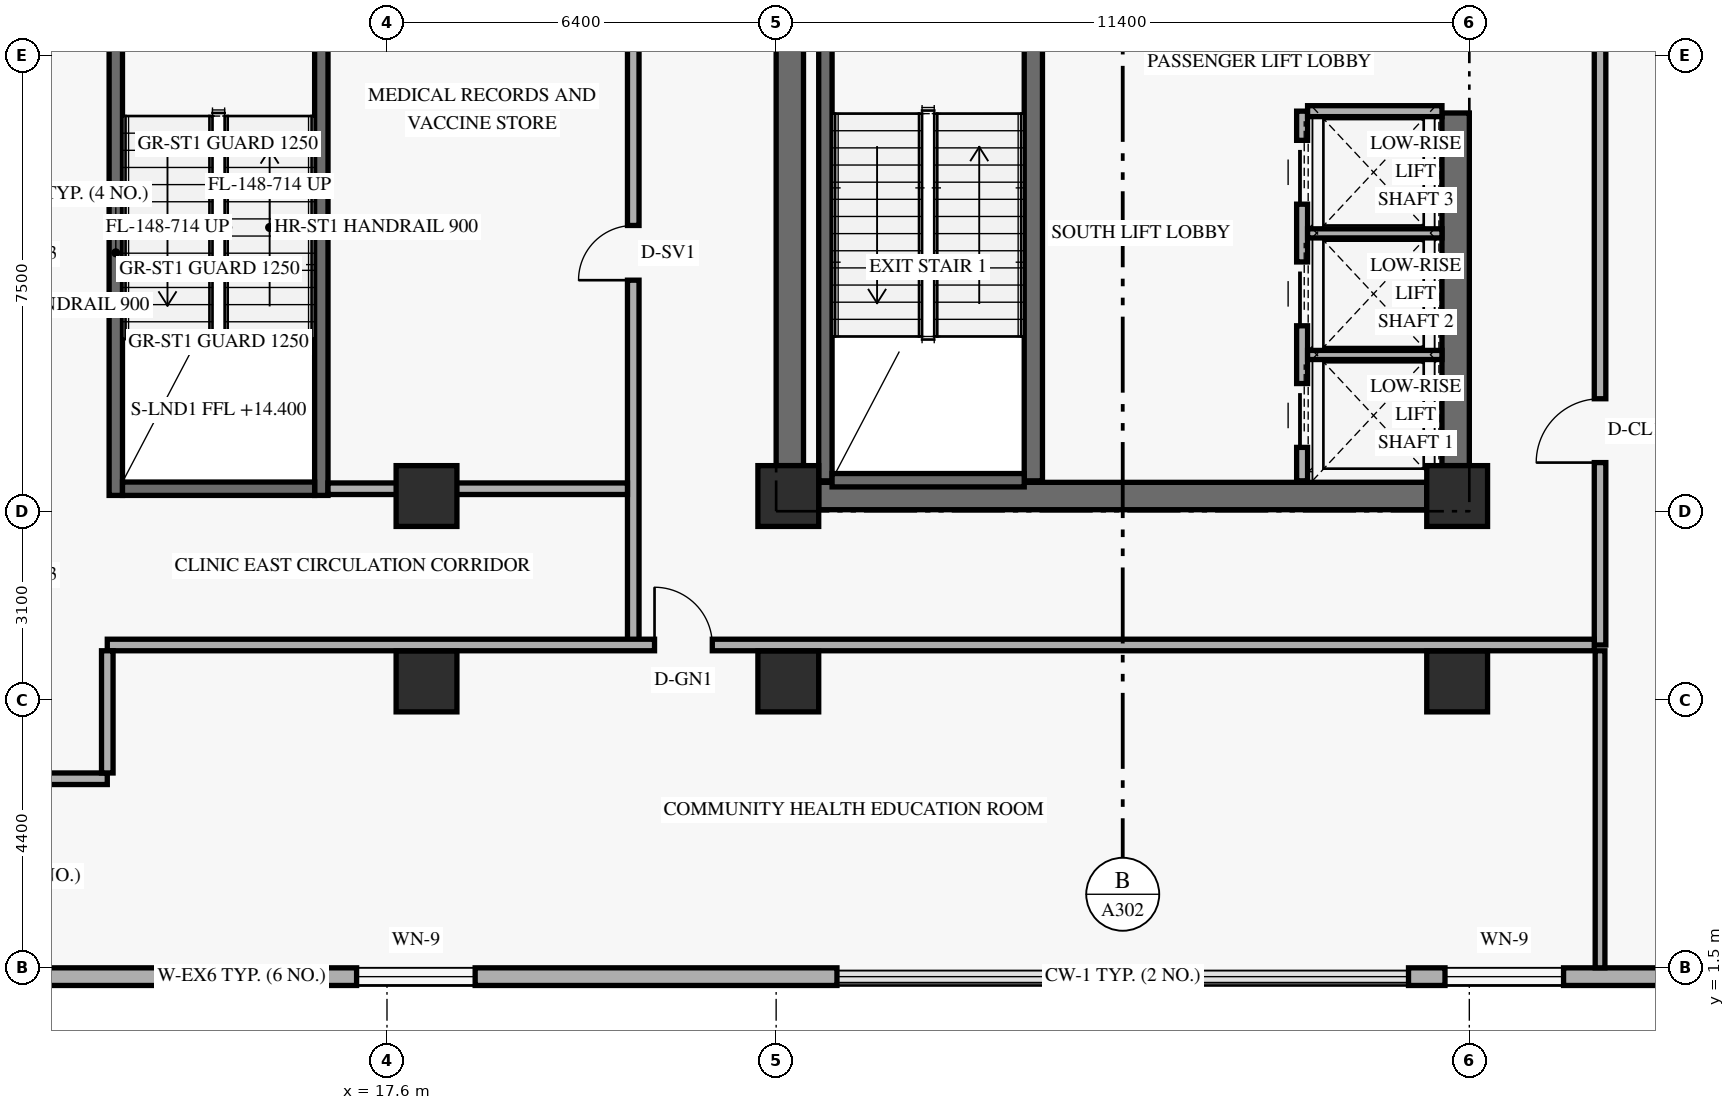
"""IFC4 building model, lengths in metres.
Left out: names, types, materials, properties, quantities, classifications, styles, units other than length and angle.
Written with IfcOpenShell. Run it as: python <this file> out.ifc"""

import sys

from ifc_helpers import new_model, si_unit, direction, frame, frame_2d, origin, origin_2d, place, context, subcontext, project, spatial, rectangle, extrude, element, fill, save


model = new_model("IFC4")
c1 = context("Model", 3, precision=1e-05, world=origin(), true_north=direction((0.0, 1.0)))
c2 = subcontext(c1, "Body", "Model", "MODEL_VIEW")
j1 = project(units=[si_unit("LENGTHUNIT", "METRE"), si_unit("PLANEANGLEUNIT", "RADIAN")], contexts=[c1])
p1 = place(None, origin())
s1 = spatial("IfcSite", under=j1, at=p1, CompositionType="ELEMENT")
p2 = place(p1, origin())
s2 = spatial("IfcBuilding", under=s1, at=p2, CompositionType="ELEMENT")
p3 = place(p2, frame((0.0, 0.0, 14.4)))
s3 = spatial("IfcBuildingStorey", under=s2, at=p3, CompositionType="ELEMENT", Elevation=14.4)
p4 = place(p3, frame((24.225, 9.75, 0.0), z_axis=(0.0, 0.0, 1.0), x_axis=(0.0, 1.0, 0.0)))
e1 = element("IfcWall", 1, at=p4, inside=s3, PredefinedType="SHEAR", context=c2, shape_type="SweptSolid", body=[
    extrude(rectangle(XDim=7.3, YDim=0.45, at=frame_2d((3.65, 0.0))), origin(), (0.0, 0.0, 1.0), 3.62),
])
p5 = place(p3, frame((35.175, 9.75, 0.0), z_axis=(0.0, 0.0, 1.0), x_axis=(0.0, 1.0, 0.0)))
e2 = element("IfcWall", 2, at=p5, inside=s3, PredefinedType="SHEAR", context=c2, shape_type="SweptSolid", body=[
    extrude(rectangle(XDim=5.8, YDim=0.45, at=frame_2d((2.9, 0.0))), origin(), (0.0, 0.0, 1.0), 3.62),
])
p6 = place(p3, frame((24.7, 9.25, 0.0), z_axis=(0.0, 0.0, 1.0), x_axis=(1.0, 0.0, 0.0)))
e3 = element("IfcWall", 3, at=p6, inside=s3, PredefinedType="SHEAR", context=c2, shape_type="SweptSolid", body=[
    extrude(rectangle(XDim=10.0, YDim=0.45, at=frame_2d((5.0, 0.0))), origin(), (0.0, 0.0, 1.0), 4.39),
])
p7 = place(p3, frame((24.81, 9.5, 0.0), z_axis=(0.0, 0.0, 1.0), x_axis=(0.0, 1.0, 0.0)))
e4 = element("IfcWall", 4, at=p7, inside=s3, PredefinedType="SHEAR", context=c2, shape_type="SweptSolid", body=[
    extrude(rectangle(XDim=7.76, YDim=0.22, at=frame_2d((3.88, 0.0))), origin(), (0.0, 0.0, 1.0), 4.39),
])
p8 = place(p3, frame((28.23, 9.5, 0.0), z_axis=(0.0, 0.0, 1.0), x_axis=(0.0, 1.0, 0.0)))
e5 = element("IfcWall", 5, at=p8, inside=s3, PredefinedType="SHEAR", context=c2, shape_type="SweptSolid", body=[
    extrude(rectangle(XDim=7.76, YDim=0.3, at=frame_2d((3.88, 0.0))), origin(), (0.0, 0.0, 1.0), 4.39),
])
p9 = place(p3, frame((24.92, 9.51, 0.0), z_axis=(0.0, 0.0, 1.0), x_axis=(1.0, 0.0, 0.0)))
e6 = element("IfcWall", 6, at=p9, inside=s3, PredefinedType="SHEAR", context=c2, shape_type="SweptSolid", body=[
    extrude(rectangle(XDim=3.16, YDim=0.22, at=frame_2d((1.58, 0.0))), origin(), (0.0, 0.0, 1.0), 4.39),
])
for number, where, z_axis, x_axis in (
    (7, (13.14, 9.26, 0.0), (0.0, 0.0, 1.0), (0.0, 1.0, 0.0)),
    (8, (16.52, 9.26, 0.0), (0.0, 0.0, 1.0), (0.0, 1.0, 0.0)),
):
    element("IfcWall", number, at=place(p3, frame(where, z_axis=z_axis, x_axis=x_axis)), inside=s3, PredefinedType="SHEAR", context=c2, shape_type="SweptSolid", body=[
        extrude(rectangle(XDim=7.98, YDim=0.22, at=frame_2d((3.99, 0.0))), origin(), (0.0, 0.0, 1.0), 4.39),
    ])
p10 = place(p3, frame((13.25, 9.37, 0.0), z_axis=(0.0, 0.0, 1.0), x_axis=(1.0, 0.0, 0.0)))
e9 = element("IfcWall", 9, at=p10, inside=s3, PredefinedType="SHEAR", context=c2, shape_type="SweptSolid", body=[
    extrude(rectangle(XDim=3.16, YDim=0.22, at=frame_2d((1.58, 0.0))), origin(), (0.0, 0.0, 1.0), 4.39),
])
for number, where, z_axis, x_axis in (
    (10, (18.25, 6.2, 0.0), (0.0, 0.0, 1.0), (1.0, 0.0, 0.0)),
    (11, (18.25, 9.25, 0.0), (0.0, 0.0, 1.0), (1.0, 0.0, 0.0)),
    (12, (24.2, 6.2, 0.0), (0.0, 0.0, 1.0), (1.0, 0.0, 0.0)),
    (13, (24.2, 9.25, 0.0), (0.0, 0.0, 1.0), (1.0, 0.0, 0.0)),
    (14, (35.2, 6.2, 0.0), (0.0, 0.0, 1.0), (1.0, 0.0, 0.0)),
    (15, (35.2, 9.25, 0.0), (0.0, 0.0, 1.0), (1.0, 0.0, 0.0)),
):
    element("IfcColumn", number, at=place(p3, frame(where, z_axis=z_axis, x_axis=x_axis)), inside=s3, PredefinedType="COLUMN", context=c2, shape_type="SweptSolid", body=[
        extrude(rectangle(XDim=1.0, YDim=1.0, at=origin_2d()), origin(), (0.0, 0.0, 1.0), 4.8),
    ])
p11 = place(p3, frame((5.42, 1.345, 0.0), z_axis=(0.0, 0.0, 1.0), x_axis=(1.0, 0.0, 0.0)))
e16 = element("IfcWall", 16, at=p11, inside=s3, PredefinedType="SOLIDWALL", context=c2, shape_type="SweptSolid", body=[
    extrude(rectangle(XDim=19.58, YDim=0.29, at=frame_2d((9.79, 0.0))), origin(), (0.0, 0.0, 1.0), 4.39),
])
p12 = place(p11, frame((1.89, 0.0, 0.85)))
e17 = element("IfcOpeningElement", 17, at=p12, cuts=e16, PredefinedType="OPENING", context=c2, shape_type="SweptSolid", body=[
    extrude(rectangle(XDim=1.95, YDim=1.75, at=frame_2d((0.975, 0.875))), frame((0.0, 0.155, 0.0), z_axis=(0.0, -1.0, 0.0), x_axis=(1.0, 0.0, 0.0)), (0.0, 0.0, 1.0), 0.31),
])
p13 = place(p11, frame((11.68, 0.0, 0.85)))
e18 = element("IfcOpeningElement", 18, at=p13, cuts=e16, PredefinedType="OPENING", context=c2, shape_type="SweptSolid", body=[
    extrude(rectangle(XDim=1.95, YDim=1.75, at=frame_2d((0.975, 0.875))), frame((0.0, 0.155, 0.0), z_axis=(0.0, -1.0, 0.0), x_axis=(1.0, 0.0, 0.0)), (0.0, 0.0, 1.0), 0.31),
])
p14 = place(p3, frame((34.4, 1.345, 0.0), z_axis=(0.0, 0.0, 1.0), x_axis=(1.0, 0.0, 0.0)))
e19 = element("IfcWall", 19, at=p14, inside=s3, PredefinedType="SOLIDWALL", context=c2, shape_type="SweptSolid", body=[
    extrude(rectangle(XDim=13.78, YDim=0.29, at=frame_2d((6.89, 0.0))), origin(), (0.0, 0.0, 1.0), 4.39),
])
p15 = place(p14, frame((0.6, 0.0, 0.85)))
e20 = element("IfcOpeningElement", 20, at=p15, cuts=e19, PredefinedType="OPENING", context=c2, shape_type="SweptSolid", body=[
    extrude(rectangle(XDim=1.95, YDim=1.75, at=frame_2d((0.975, 0.875))), frame((0.0, 0.155, 0.0), z_axis=(0.0, -1.0, 0.0), x_axis=(1.0, 0.0, 0.0)), (0.0, 0.0, 1.0), 0.31),
])
p16 = place(p14, frame((7.49, 0.0, 0.85)))
e21 = element("IfcOpeningElement", 21, at=p16, cuts=e19, PredefinedType="OPENING", context=c2, shape_type="SweptSolid", body=[
    extrude(rectangle(XDim=1.95, YDim=1.75, at=frame_2d((0.975, 0.875))), frame((0.0, 0.155, 0.0), z_axis=(0.0, -1.0, 0.0), x_axis=(1.0, 0.0, 0.0)), (0.0, 0.0, 1.0), 0.31),
])
p17 = place(p3, frame((32.65, 9.5, 0.0), z_axis=(0.0, 0.0, 1.0), x_axis=(0.0, 1.0, 0.0)))
e22 = element("IfcWall", 22, at=p17, inside=s3, PredefinedType="STANDARD", context=c2, shape_type="SweptSolid", body=[
    extrude(rectangle(XDim=6.08, YDim=0.18, at=frame_2d((3.04, 0.0))), origin(), (0.0, 0.0, 1.0), 4.39),
])
p18 = place(p17, frame((0.55, 0.0, 0.0)))
e23 = element("IfcOpeningElement", 23, at=p18, cuts=e22, PredefinedType="OPENING", context=c2, shape_type="SweptSolid", body=[
    extrude(rectangle(XDim=1.05, YDim=2.2, at=frame_2d((0.525, 1.1))), frame((0.0, 0.1, 0.0), z_axis=(0.0, -1.0, 0.0), x_axis=(1.0, 0.0, 0.0)), (0.0, 0.0, 1.0), 0.2),
])
p19 = place(p17, frame((2.55, 0.0, 0.0)))
e24 = element("IfcOpeningElement", 24, at=p19, cuts=e22, PredefinedType="OPENING", context=c2, shape_type="SweptSolid", body=[
    extrude(rectangle(XDim=1.05, YDim=2.2, at=frame_2d((0.525, 1.1))), frame((0.0, 0.1, 0.0), z_axis=(0.0, -1.0, 0.0), x_axis=(1.0, 0.0, 0.0)), (0.0, 0.0, 1.0), 0.2),
])
p20 = place(p17, frame((4.55, 0.0, 0.0)))
e25 = element("IfcOpeningElement", 25, at=p20, cuts=e22, PredefinedType="OPENING", context=c2, shape_type="SweptSolid", body=[
    extrude(rectangle(XDim=1.05, YDim=2.2, at=frame_2d((0.525, 1.1))), frame((0.0, 0.1, 0.0), z_axis=(0.0, -1.0, 0.0), x_axis=(1.0, 0.0, 0.0)), (0.0, 0.0, 1.0), 0.2),
])
p21 = place(p3, frame((32.74, 15.58, 0.0), z_axis=(0.0, 0.0, 1.0), x_axis=(1.0, 0.0, 0.0)))
e26 = element("IfcWall", 26, at=p21, inside=s3, PredefinedType="STANDARD", context=c2, shape_type="SweptSolid", body=[
    extrude(rectangle(XDim=2.21, YDim=0.18, at=frame_2d((1.105, 0.0))), origin(), (0.0, 0.0, 1.0), 4.39),
])
for number, where, z_axis, x_axis in (
    (27, (32.74, 11.57, 0.0), (0.0, 0.0, 1.0), (1.0, 0.0, 0.0)),
    (28, (32.74, 13.57, 0.0), (0.0, 0.0, 1.0), (1.0, 0.0, 0.0)),
):
    element("IfcWall", number, at=place(p3, frame(where, z_axis=z_axis, x_axis=x_axis)), inside=s3, PredefinedType="STANDARD", context=c2, shape_type="SweptSolid", body=[
        extrude(rectangle(XDim=2.21, YDim=0.15, at=frame_2d((1.105, 0.0))), origin(), (0.0, 0.0, 1.0), 4.39),
    ])
p22 = place(p3, frame((21.65, 6.8, 0.0), z_axis=(0.0, 0.0, 1.0), x_axis=(0.0, 1.0, 0.0)))
e29 = element("IfcWall", 29, at=p22, inside=s3, PredefinedType="STANDARD", context=c2, shape_type="SweptSolid", body=[
    extrude(rectangle(XDim=34.4, YDim=0.19, at=frame_2d((17.2, 0.0))), origin(), (0.0, 0.0, 1.0), 3.445),
])
p23 = place(p22, frame((21.72, 0.0, 0.0)))
e30 = element("IfcOpeningElement", 30, at=p23, cuts=e29, PredefinedType="OPENING", context=c2, shape_type="SweptSolid", body=[
    extrude(rectangle(XDim=0.92, YDim=2.14, at=frame_2d((0.46, 1.07))), frame((0.0, 0.105, 0.0), z_axis=(0.0, -1.0, 0.0), x_axis=(1.0, 0.0, 0.0)), (0.0, 0.0, 1.0), 0.21),
])
p24 = place(p22, frame((28.2, 0.0, 0.0)))
e31 = element("IfcOpeningElement", 31, at=p24, cuts=e29, PredefinedType="OPENING", context=c2, shape_type="SweptSolid", body=[
    extrude(rectangle(XDim=0.95, YDim=2.15, at=frame_2d((0.475, 1.075))), frame((0.0, 0.105, 0.0), z_axis=(0.0, -1.0, 0.0), x_axis=(1.0, 0.0, 0.0)), (0.0, 0.0, 1.0), 0.21),
])
p25 = place(p22, frame((6.0, 0.0, 0.0)))
e32 = element("IfcOpeningElement", 32, at=p25, cuts=e29, PredefinedType="OPENING", context=c2, shape_type="SweptSolid", body=[
    extrude(rectangle(XDim=0.9, YDim=2.1, at=frame_2d((0.45, 1.05))), frame((0.0, 0.105, 0.0), z_axis=(0.0, -1.0, 0.0), x_axis=(1.0, 0.0, 0.0)), (0.0, 0.0, 1.0), 0.21),
])
p26 = place(p3, frame((37.55, 6.8, 0.0), z_axis=(0.0, 0.0, 1.0), x_axis=(0.0, 1.0, 0.0)))
e33 = element("IfcWall", 33, at=p26, inside=s3, PredefinedType="STANDARD", context=c2, shape_type="SweptSolid", body=[
    extrude(rectangle(XDim=34.4, YDim=0.19, at=frame_2d((17.2, 0.0))), origin(), (0.0, 0.0, 1.0), 3.445),
])
p27 = place(p26, frame((3.0, 0.0, 0.0)))
e34 = element("IfcOpeningElement", 34, at=p27, cuts=e33, PredefinedType="OPENING", context=c2, shape_type="SweptSolid", body=[
    extrude(rectangle(XDim=1.05, YDim=2.15, at=frame_2d((0.525, 1.075))), frame((0.0, 0.105, 0.0), z_axis=(0.0, -1.0, 0.0), x_axis=(1.0, 0.0, 0.0)), (0.0, 0.0, 1.0), 0.21),
])
p28 = place(p26, frame((18.145, 0.0, 0.0)))
e35 = element("IfcOpeningElement", 35, at=p28, cuts=e33, PredefinedType="OPENING", context=c2, shape_type="SweptSolid", body=[
    extrude(rectangle(XDim=1.2, YDim=2.15, at=frame_2d((0.6, 1.075))), frame((0.0, 0.105, 0.0), z_axis=(0.0, -1.0, 0.0), x_axis=(1.0, 0.0, 0.0)), (0.0, 0.0, 1.0), 0.21),
])
p29 = place(p26, frame((29.46, 0.0, 0.0)))
e36 = element("IfcOpeningElement", 36, at=p29, cuts=e33, PredefinedType="OPENING", context=c2, shape_type="SweptSolid", body=[
    extrude(rectangle(XDim=1.05, YDim=2.15, at=frame_2d((0.525, 1.075))), frame((0.0, 0.105, 0.0), z_axis=(0.0, -1.0, 0.0), x_axis=(1.0, 0.0, 0.0)), (0.0, 0.0, 1.0), 0.21),
])
p30 = place(p3, frame((13.0, 6.8, 0.0), z_axis=(0.0, 0.0, 1.0), x_axis=(1.0, 0.0, 0.0)))
e37 = element("IfcWall", 37, at=p30, inside=s3, PredefinedType="STANDARD", context=c2, shape_type="SweptSolid", body=[
    extrude(rectangle(XDim=24.455, YDim=0.19, at=frame_2d((12.228, 0.0))), origin(), (0.0, 0.0, 1.0), 3.602),
])
p31 = place(p30, frame((9.0, 0.0, 0.0)))
e38 = element("IfcOpeningElement", 38, at=p31, cuts=e37, PredefinedType="OPENING", context=c2, shape_type="SweptSolid", body=[
    extrude(rectangle(XDim=0.95, YDim=2.15, at=frame_2d((0.475, 1.075))), frame((0.0, 0.105, 0.0), z_axis=(0.0, -1.0, 0.0), x_axis=(1.0, 0.0, 0.0)), (0.0, 0.0, 1.0), 0.21),
])
p32 = place(p3, frame((11.15, 4.6, 0.0), z_axis=(0.0, 0.0, 1.0), x_axis=(1.0, 0.0, 0.0)))
e39 = element("IfcWall", 39, at=p32, inside=s3, PredefinedType="STANDARD", context=c2, shape_type="SweptSolid", body=[
    extrude(rectangle(XDim=1.85, YDim=0.19, at=frame_2d((0.925, 0.0))), origin(), (0.0, 0.0, 1.0), 4.39),
])
p33 = place(p3, frame((13.0, 4.695, 0.0), z_axis=(0.0, 0.0, 1.0), x_axis=(0.0, 1.0, 0.0)))
e40 = element("IfcWall", 40, at=p33, inside=s3, PredefinedType="STANDARD", context=c2, shape_type="SweptSolid", body=[
    extrude(rectangle(XDim=2.01, YDim=0.19, at=frame_2d((1.005, 0.0))), origin(), (0.0, 0.0, 1.0), 3.839),
])
p34 = place(p3, frame((16.63, 9.37, 0.0), z_axis=(0.0, 0.0, 1.0), x_axis=(1.0, 0.0, 0.0)))
e41 = element("IfcWall", 41, at=p34, inside=s3, PredefinedType="STANDARD", context=c2, shape_type="SweptSolid", body=[
    extrude(rectangle(XDim=4.925, YDim=0.19, at=frame_2d((2.462, 0.0))), origin(), (0.0, 0.0, 1.0), 3.445),
])
p35 = place(p3, frame((37.55, 1.49, 0.0), z_axis=(0.0, 0.0, 1.0), x_axis=(0.0, 1.0, 0.0)))
e42 = element("IfcWall", 42, at=p35, inside=s3, PredefinedType="PARTITIONING", context=c2, shape_type="SweptSolid", body=[
    extrude(rectangle(XDim=5.215, YDim=0.16, at=frame_2d((2.607, 0.0))), origin(), (0.0, 0.0, 1.0), 3.839),
])
p36 = place(p13, origin())
e43 = element("IfcWindow", 43, at=p36, inside=s3, PartitioningType="SINGLE_PANEL", PredefinedType="WINDOW", context=c2, shape_type="SweptSolid", body=[
    extrude(rectangle(XDim=1.95, YDim=1.75, at=frame_2d((0.975, 0.875))), frame((0.0, 0.03, 0.0), z_axis=(0.0, -1.0, 0.0), x_axis=(1.0, 0.0, 0.0)), (0.0, 0.0, 1.0), 0.06),
])
fill(e18, e43)
p37 = place(p15, origin())
e44 = element("IfcWindow", 44, at=p37, inside=s3, PartitioningType="SINGLE_PANEL", PredefinedType="WINDOW", context=c2, shape_type="SweptSolid", body=[
    extrude(rectangle(XDim=1.95, YDim=1.75, at=frame_2d((0.975, 0.875))), frame((0.0, 0.03, 0.0), z_axis=(0.0, -1.0, 0.0), x_axis=(1.0, 0.0, 0.0)), (0.0, 0.0, 1.0), 0.06),
])
fill(e20, e44)
p38 = place(p18, origin())
e45 = element("IfcDoor", 45, at=p38, inside=s3, OperationType="SLIDING_TO_LEFT", PredefinedType="DOOR", context=c2, shape_type="SweptSolid", body=[
    extrude(rectangle(XDim=1.05, YDim=2.2, at=frame_2d((0.525, 1.1))), frame((0.0, 0.025, 0.0), z_axis=(0.0, -1.0, 0.0), x_axis=(1.0, 0.0, 0.0)), (0.0, 0.0, 1.0), 0.05),
])
fill(e23, e45)
p39 = place(p19, origin())
e46 = element("IfcDoor", 46, at=p39, inside=s3, OperationType="SLIDING_TO_LEFT", PredefinedType="DOOR", context=c2, shape_type="SweptSolid", body=[
    extrude(rectangle(XDim=1.05, YDim=2.2, at=frame_2d((0.525, 1.1))), frame((0.0, 0.025, 0.0), z_axis=(0.0, -1.0, 0.0), x_axis=(1.0, 0.0, 0.0)), (0.0, 0.0, 1.0), 0.05),
])
fill(e24, e46)
p40 = place(p20, origin())
e47 = element("IfcDoor", 47, at=p40, inside=s3, OperationType="SLIDING_TO_LEFT", PredefinedType="DOOR", context=c2, shape_type="SweptSolid", body=[
    extrude(rectangle(XDim=1.05, YDim=2.2, at=frame_2d((0.525, 1.1))), frame((0.0, 0.025, 0.0), z_axis=(0.0, -1.0, 0.0), x_axis=(1.0, 0.0, 0.0)), (0.0, 0.0, 1.0), 0.05),
])
fill(e25, e47)
p41 = place(p27, origin())
e48 = element("IfcDoor", 48, at=p41, inside=s3, OperationType="SINGLE_SWING_LEFT", PredefinedType="DOOR", context=c2, shape_type="SweptSolid", body=[
    extrude(rectangle(XDim=1.05, YDim=2.15, at=frame_2d((0.525, 1.075))), frame((0.0, 0.025, 0.0), z_axis=(0.0, -1.0, 0.0), x_axis=(1.0, 0.0, 0.0)), (0.0, 0.0, 1.0), 0.05),
])
fill(e34, e48)
p42 = place(p25, origin())
e49 = element("IfcDoor", 49, at=p42, inside=s3, OperationType="SINGLE_SWING_LEFT", PredefinedType="DOOR", context=c2, shape_type="SweptSolid", body=[
    extrude(rectangle(XDim=0.9, YDim=2.1, at=frame_2d((0.45, 1.05))), frame((0.0, 0.025, 0.0), z_axis=(0.0, -1.0, 0.0), x_axis=(1.0, 0.0, 0.0)), (0.0, 0.0, 1.0), 0.05),
])
fill(e32, e49)
p43 = place(p31, origin())
e50 = element("IfcDoor", 50, at=p43, inside=s3, OperationType="SINGLE_SWING_LEFT", PredefinedType="DOOR", context=c2, shape_type="SweptSolid", body=[
    extrude(rectangle(XDim=0.95, YDim=2.15, at=frame_2d((0.475, 1.075))), frame((0.0, 0.025, 0.0), z_axis=(0.0, -1.0, 0.0), x_axis=(1.0, 0.0, 0.0)), (0.0, 0.0, 1.0), 0.05),
])
fill(e38, e50)
save(model, sys.argv[1])
